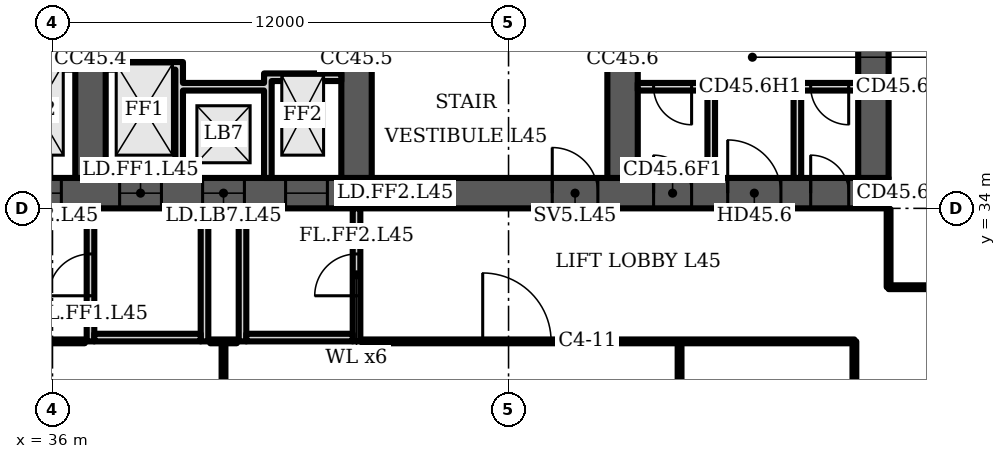
"""IFC4 building model, lengths in metres.
Left out: names, types, materials, properties, quantities, classifications, styles, units other than length and angle.
Written with IfcOpenShell. Run it as: python <this file> out.ifc"""

import sys

from ifc_helpers import new_model, si_unit, direction, frame, frame_2d, origin, place, context, subcontext, project, spatial, polyline, rectangle, outline, extrude, element, fill, save


model = new_model("IFC4")
c1 = context("Model", 3, precision=1e-05, world=origin(), true_north=direction((0.0, 1.0)))
c2 = subcontext(c1, "Body", "Model", "MODEL_VIEW")
j1 = project(units=[si_unit("LENGTHUNIT", "METRE"), si_unit("PLANEANGLEUNIT", "RADIAN")], contexts=[c1])
p1 = place(None, origin())
s1 = spatial("IfcSite", under=j1, at=p1, CompositionType="ELEMENT")
p2 = place(p1, origin())
s2 = spatial("IfcBuilding", under=s1, at=p2, CompositionType="ELEMENT")
p3 = place(p2, frame((0.0, 0.0, 184.3)))
s3 = spatial("IfcBuildingStorey", under=s2, at=p3, CompositionType="ELEMENT", Elevation=184.3)
p4 = place(p3, frame((16.0, 34.4, 0.0), z_axis=(0.0, 0.0, 1.0), x_axis=(1.0, 0.0, 0.0)))
e1 = element("IfcWall", 1, at=p4, inside=s3, PredefinedType="SHEAR", context=c2, shape_type="SweptSolid", body=[
    extrude(rectangle(XDim=42.0, YDim=0.8, at=frame_2d((21.0, 0.0))), origin(), (0.0, 0.0, 1.0), 3.6),
])
p5 = place(p4, frame((1.75, 0.0, 0.0)))
e2 = element("IfcOpeningElement", 2, at=p5, cuts=e1, PredefinedType="OPENING", context=c2, shape_type="SweptSolid", body=[
    extrude(rectangle(XDim=1.0, YDim=2.1, at=frame_2d((0.5, 1.05))), frame((0.0, 0.41, 0.0), z_axis=(0.0, -1.0, 0.0), x_axis=(1.0, 0.0, 0.0)), (0.0, 0.0, 1.0), 0.82),
])
p6 = place(p4, frame((4.65, 0.0, 0.0)))
e3 = element("IfcOpeningElement", 3, at=p6, cuts=e1, PredefinedType="OPENING", context=c2, shape_type="SweptSolid", body=[
    extrude(rectangle(XDim=1.0, YDim=2.1, at=frame_2d((0.5, 1.05))), frame((0.0, 0.41, 0.0), z_axis=(0.0, -1.0, 0.0), x_axis=(1.0, 0.0, 0.0)), (0.0, 0.0, 1.0), 0.82),
])
p7 = place(p4, frame((7.65, 0.0, 0.0)))
e4 = element("IfcOpeningElement", 4, at=p7, cuts=e1, PredefinedType="OPENING", context=c2, shape_type="SweptSolid", body=[
    extrude(rectangle(XDim=1.2, YDim=2.1, at=frame_2d((0.6, 1.05))), frame((0.0, 0.41, 0.0), z_axis=(0.0, -1.0, 0.0), x_axis=(1.0, 0.0, 0.0)), (0.0, 0.0, 1.0), 0.82),
])
p8 = place(p4, frame((14.767, 0.0, 0.0)))
e5 = element("IfcOpeningElement", 5, at=p8, cuts=e1, PredefinedType="OPENING", context=c2, shape_type="SweptSolid", body=[
    extrude(rectangle(XDim=1.1, YDim=2.1, at=frame_2d((0.55, 1.05))), frame((0.0, 0.41, 0.0), z_axis=(0.0, -1.0, 0.0), x_axis=(1.0, 0.0, 0.0)), (0.0, 0.0, 1.0), 0.82),
])
p9 = place(p4, frame((19.133, 0.0, 0.0)))
e6 = element("IfcOpeningElement", 6, at=p9, cuts=e1, PredefinedType="OPENING", context=c2, shape_type="SweptSolid", body=[
    extrude(rectangle(XDim=1.1, YDim=2.1, at=frame_2d((0.55, 1.05))), frame((0.0, 0.41, 0.0), z_axis=(0.0, -1.0, 0.0), x_axis=(1.0, 0.0, 0.0)), (0.0, 0.0, 1.0), 0.82),
])
p10 = place(p4, frame((16.8, 0.0, 0.0)))
e7 = element("IfcOpeningElement", 7, at=p10, cuts=e1, PredefinedType="OPENING", context=c2, shape_type="SweptSolid", body=[
    extrude(rectangle(XDim=1.4, YDim=2.1, at=frame_2d((0.7, 1.05))), frame((0.0, 0.41, 0.0), z_axis=(0.0, -1.0, 0.0), x_axis=(1.0, 0.0, 0.0)), (0.0, 0.0, 1.0), 0.82),
])
p11 = place(p4, frame((21.767, 0.0, 0.0)))
e8 = element("IfcOpeningElement", 8, at=p11, cuts=e1, PredefinedType="OPENING", context=c2, shape_type="SweptSolid", body=[
    extrude(rectangle(XDim=1.1, YDim=2.1, at=frame_2d((0.55, 1.05))), frame((0.0, 0.41, 0.0), z_axis=(0.0, -1.0, 0.0), x_axis=(1.0, 0.0, 0.0)), (0.0, 0.0, 1.0), 0.82),
])
p12 = place(p4, frame((23.95, 0.0, 0.0)))
e9 = element("IfcOpeningElement", 9, at=p12, cuts=e1, PredefinedType="OPENING", context=c2, shape_type="SweptSolid", body=[
    extrude(rectangle(XDim=1.1, YDim=2.1, at=frame_2d((0.55, 1.05))), frame((0.0, 0.41, 0.0), z_axis=(0.0, -1.0, 0.0), x_axis=(1.0, 0.0, 0.0)), (0.0, 0.0, 1.0), 0.82),
])
p13 = place(p4, frame((26.133, 0.0, 0.0)))
e10 = element("IfcOpeningElement", 10, at=p13, cuts=e1, PredefinedType="OPENING", context=c2, shape_type="SweptSolid", body=[
    extrude(rectangle(XDim=1.1, YDim=2.1, at=frame_2d((0.55, 1.05))), frame((0.0, 0.41, 0.0), z_axis=(0.0, -1.0, 0.0), x_axis=(1.0, 0.0, 0.0)), (0.0, 0.0, 1.0), 0.82),
])
p14 = place(p4, frame((33.15, 0.0, 0.0)))
e11 = element("IfcOpeningElement", 11, at=p14, cuts=e1, PredefinedType="OPENING", context=c2, shape_type="SweptSolid", body=[
    extrude(rectangle(XDim=1.2, YDim=2.1, at=frame_2d((0.6, 1.05))), frame((0.0, 0.41, 0.0), z_axis=(0.0, -1.0, 0.0), x_axis=(1.0, 0.0, 0.0)), (0.0, 0.0, 1.0), 0.82),
])
p15 = place(p4, frame((35.817, 0.0, 0.0)))
e12 = element("IfcOpeningElement", 12, at=p15, cuts=e1, PredefinedType="OPENING", context=c2, shape_type="SweptSolid", body=[
    extrude(rectangle(XDim=1.0, YDim=2.1, at=frame_2d((0.5, 1.05))), frame((0.0, 0.41, 0.0), z_axis=(0.0, -1.0, 0.0), x_axis=(1.0, 0.0, 0.0)), (0.0, 0.0, 1.0), 0.82),
])
p16 = place(p4, frame((39.95, 0.0, 0.0)))
e13 = element("IfcOpeningElement", 13, at=p16, cuts=e1, PredefinedType="OPENING", context=c2, shape_type="SweptSolid", body=[
    extrude(rectangle(XDim=1.0, YDim=2.1, at=frame_2d((0.5, 1.05))), frame((0.0, 0.41, 0.0), z_axis=(0.0, -1.0, 0.0), x_axis=(1.0, 0.0, 0.0)), (0.0, 0.0, 1.0), 0.82),
])
p17 = place(p4, frame((37.767, 0.0, 0.0)))
e14 = element("IfcOpeningElement", 14, at=p17, cuts=e1, PredefinedType="OPENING", context=c2, shape_type="SweptSolid", body=[
    extrude(rectangle(XDim=1.4, YDim=2.1, at=frame_2d((0.7, 1.05))), frame((0.0, 0.41, 0.0), z_axis=(0.0, -1.0, 0.0), x_axis=(1.0, 0.0, 0.0)), (0.0, 0.0, 1.0), 0.82),
])
p18 = place(p3, frame((37.0, 34.8, 0.0), z_axis=(0.0, 0.0, 1.0), x_axis=(0.0, 1.0, 0.0)))
e15 = element("IfcWall", 15, at=p18, inside=s3, PredefinedType="SHEAR", context=c2, shape_type="SweptSolid", body=[
    extrude(rectangle(XDim=14.987, YDim=0.8, at=frame_2d((7.493, 0.0))), origin(), (0.0, 0.0, 1.0), 3.6),
])
p19 = place(p18, frame((11.312, 0.0, 0.0)))
e16 = element("IfcOpeningElement", 16, at=p19, cuts=e15, PredefinedType="OPENING", context=c2, shape_type="SweptSolid", body=[
    extrude(rectangle(XDim=1.0, YDim=2.1, at=frame_2d((0.5, 1.05))), frame((0.0, 0.41, 0.0), z_axis=(0.0, -1.0, 0.0), x_axis=(1.0, 0.0, 0.0)), (0.0, 0.0, 1.0), 0.82),
])
p20 = place(p18, frame((3.6, 0.0, 0.0)))
e17 = element("IfcOpeningElement", 17, at=p20, cuts=e15, PredefinedType="OPENING", context=c2, shape_type="SweptSolid", body=[
    extrude(rectangle(XDim=1.1, YDim=2.1, at=frame_2d((0.55, 1.05))), frame((0.0, 0.41, 0.0), z_axis=(0.0, -1.0, 0.0), x_axis=(1.0, 0.0, 0.0)), (0.0, 0.0, 1.0), 0.82),
])
p21 = place(p3, frame((44.0, 34.8, 0.0), z_axis=(0.0, 0.0, 1.0), x_axis=(0.0, 1.0, 0.0)))
e18 = element("IfcWall", 18, at=p21, inside=s3, PredefinedType="SHEAR", context=c2, shape_type="SweptSolid", body=[
    extrude(rectangle(XDim=14.374, YDim=0.8, at=frame_2d((7.187, 0.0))), origin(), (0.0, 0.0, 1.0), 3.6),
])
p22 = place(p21, frame((11.312, 0.0, 0.0)))
e19 = element("IfcOpeningElement", 19, at=p22, cuts=e18, PredefinedType="OPENING", context=c2, shape_type="SweptSolid", body=[
    extrude(rectangle(XDim=1.0, YDim=2.1, at=frame_2d((0.5, 1.05))), frame((0.0, 0.41, 0.0), z_axis=(0.0, -1.0, 0.0), x_axis=(1.0, 0.0, 0.0)), (0.0, 0.0, 1.0), 0.82),
])
p23 = place(p21, frame((3.6, 0.0, 0.0)))
e20 = element("IfcOpeningElement", 20, at=p23, cuts=e18, PredefinedType="OPENING", context=c2, shape_type="SweptSolid", body=[
    extrude(rectangle(XDim=1.1, YDim=2.1, at=frame_2d((0.55, 1.05))), frame((0.0, 0.41, 0.0), z_axis=(0.0, -1.0, 0.0), x_axis=(1.0, 0.0, 0.0)), (0.0, 0.0, 1.0), 0.82),
])
p24 = place(p3, frame((51.0, 34.8, 0.0), z_axis=(0.0, 0.0, 1.0), x_axis=(0.0, 1.0, 0.0)))
e21 = element("IfcWall", 21, at=p24, inside=s3, PredefinedType="SHEAR", context=c2, shape_type="SweptSolid", body=[
    extrude(rectangle(XDim=13.762, YDim=0.8, at=frame_2d((6.881, 0.0))), origin(), (0.0, 0.0, 1.0), 3.6),
])
p25 = place(p24, frame((3.6, 0.0, 0.0)))
e22 = element("IfcOpeningElement", 22, at=p25, cuts=e21, PredefinedType="OPENING", context=c2, shape_type="SweptSolid", body=[
    extrude(rectangle(XDim=1.1, YDim=2.1, at=frame_2d((0.55, 1.05))), frame((0.0, 0.41, 0.0), z_axis=(0.0, -1.0, 0.0), x_axis=(1.0, 0.0, 0.0)), (0.0, 0.0, 1.0), 0.82),
])
p26 = place(p3, frame((57.6, 34.8, 0.0), z_axis=(0.0, 0.0, 1.0), x_axis=(0.0, 1.0, 0.0)))
e23 = element("IfcWall", 23, at=p26, inside=s3, PredefinedType="SHEAR", context=c2, shape_type="SweptSolid", body=[
    extrude(rectangle(XDim=13.184, YDim=0.8, at=frame_2d((6.592, 0.0))), origin(), (0.0, 0.0, 1.0), 3.6),
])
p27 = place(p3, frame((0.0, 0.0, -0.0)))
e24 = element("IfcWall", 24, at=p27, inside=s3, PredefinedType="PARTITIONING", context=c2, shape_type="SweptSolid", body=[
    extrude(outline(polyline([(34.567, 37.85), (34.767, 37.85), (36.6, 37.85), (36.6, 37.65), (34.767, 37.65), (34.767, 34.8), (34.567, 34.8), (34.567, 37.85)])), origin(), (0.0, 0.0, 1.0), 3.2),
])
p28 = place(p3, frame((0.0, 0.0, -0.0)))
e25 = element("IfcWall", 25, at=p28, inside=s3, PredefinedType="PARTITIONING", context=c2, shape_type="SweptSolid", body=[
    extrude(outline(polyline([(41.567, 37.1), (39.433, 37.1), (39.433, 34.8), (39.233, 34.8), (39.233, 37.65), (37.4, 37.65), (37.4, 37.85), (39.233, 37.85), (39.433, 37.85), (39.433, 37.3), (41.567, 37.3), (41.567, 37.55), (41.767, 37.55), (43.6, 37.55), (43.6, 37.35), (41.767, 37.35), (41.767, 34.8), (41.567, 34.8), (41.567, 37.1)])), origin(), (0.0, 0.0, 1.0), 3.2),
])
p29 = place(p3, frame((51.4, 37.2, 0.0), z_axis=(0.0, 0.0, 1.0), x_axis=(1.0, 0.0, 0.0)))
e26 = element("IfcWall", 26, at=p29, inside=s3, PredefinedType="PARTITIONING", context=c2, shape_type="SweptSolid", body=[
    extrude(rectangle(XDim=1.833, YDim=0.2, at=frame_2d((0.917, 0.0))), origin(), (0.0, 0.0, 1.0), 3.2),
])
p30 = place(p29, frame((0.417, 0.0, 0.0)))
e27 = element("IfcOpeningElement", 27, at=p30, cuts=e26, PredefinedType="OPENING", context=c2, shape_type="SweptSolid", body=[
    extrude(rectangle(XDim=1.0, YDim=2.1, at=frame_2d((0.5, 1.05))), frame((0.0, 0.11, 0.0), z_axis=(0.0, -1.0, 0.0), x_axis=(1.0, 0.0, 0.0)), (0.0, 0.0, 1.0), 0.22),
])
p31 = place(p3, frame((55.7, 37.2, 0.0), z_axis=(0.0, 0.0, 1.0), x_axis=(1.0, 0.0, 0.0)))
e28 = element("IfcWall", 28, at=p31, inside=s3, PredefinedType="PARTITIONING", context=c2, shape_type="SweptSolid", body=[
    extrude(rectangle(XDim=1.5, YDim=0.2, at=frame_2d((0.75, 0.0))), origin(), (0.0, 0.0, 1.0), 3.2),
])
p32 = place(p31, frame((0.25, 0.0, 0.0)))
e29 = element("IfcOpeningElement", 29, at=p32, cuts=e28, PredefinedType="OPENING", context=c2, shape_type="SweptSolid", body=[
    extrude(rectangle(XDim=1.0, YDim=2.1, at=frame_2d((0.5, 1.05))), frame((0.0, 0.11, 0.0), z_axis=(0.0, -1.0, 0.0), x_axis=(1.0, 0.0, 0.0)), (0.0, 0.0, 1.0), 0.22),
])
p33 = place(p3, frame((0.0, 0.0, -0.0)))
e30 = element("IfcWall", 30, at=p33, inside=s3, PredefinedType="PARTITIONING", context=c2, shape_type="SweptSolid", body=[
    extrude(outline(polyline([(53.233, 34.8), (53.233, 37.3), (53.433, 37.3), (53.433, 34.8), (53.233, 34.8)])), origin(), (0.0, 0.0, 1.0), 3.2),
])
p34 = place(p3, frame((0.0, 0.0, -0.0)))
e31 = element("IfcWall", 31, at=p34, inside=s3, PredefinedType="PARTITIONING", context=c2, shape_type="SweptSolid", body=[
    extrude(outline(polyline([(55.5, 34.8), (55.5, 37.3), (55.7, 37.3), (55.7, 34.8), (55.5, 34.8)])), origin(), (0.0, 0.0, 1.0), 3.2),
])
p35 = place(p3, frame((37.0, 30.5, 0.0), z_axis=(0.0, 0.0, 1.0), x_axis=(0.0, 1.0, 0.0)))
e32 = element("IfcWall", 32, at=p35, inside=s3, PredefinedType="PARTITIONING", context=c2, shape_type="SweptSolid", body=[
    extrude(rectangle(XDim=3.5, YDim=0.2, at=frame_2d((1.75, 0.0))), origin(), (0.0, 0.0, 1.0), 3.2),
])
p36 = place(p35, frame((1.2, 0.0, 0.0)))
e33 = element("IfcOpeningElement", 33, at=p36, cuts=e32, PredefinedType="OPENING", context=c2, shape_type="SweptSolid", body=[
    extrude(rectangle(XDim=1.1, YDim=2.1, at=frame_2d((0.55, 1.05))), frame((0.0, 0.11, 0.0), z_axis=(0.0, -1.0, 0.0), x_axis=(1.0, 0.0, 0.0)), (0.0, 0.0, 1.0), 0.22),
])
p37 = place(p3, frame((40.0, 30.5, 0.0), z_axis=(0.0, 0.0, 1.0), x_axis=(0.0, 1.0, 0.0)))
e34 = element("IfcWall", 34, at=p37, inside=s3, PredefinedType="PARTITIONING", context=c2, shape_type="SweptSolid", body=[
    extrude(rectangle(XDim=3.5, YDim=0.2, at=frame_2d((1.75, 0.0))), origin(), (0.0, 0.0, 1.0), 3.2),
])
p38 = place(p3, frame((37.1, 30.6, 0.0), z_axis=(0.0, 0.0, 1.0), x_axis=(1.0, 0.0, 0.0)))
e35 = element("IfcWall", 35, at=p38, inside=s3, PredefinedType="PARTITIONING", context=c2, shape_type="SweptSolid", body=[
    extrude(rectangle(XDim=2.8, YDim=0.2, at=frame_2d((1.4, 0.0))), origin(), (0.0, 0.0, 1.0), 3.2),
])
p39 = place(p3, frame((41.0, 30.5, 0.0), z_axis=(0.0, 0.0, 1.0), x_axis=(0.0, 1.0, 0.0)))
e36 = element("IfcWall", 36, at=p39, inside=s3, PredefinedType="PARTITIONING", context=c2, shape_type="SweptSolid", body=[
    extrude(rectangle(XDim=3.5, YDim=0.2, at=frame_2d((1.75, 0.0))), origin(), (0.0, 0.0, 1.0), 3.2),
])
p40 = place(p3, frame((44.0, 30.5, 0.0), z_axis=(0.0, 0.0, 1.0), x_axis=(0.0, 1.0, 0.0)))
e37 = element("IfcWall", 37, at=p40, inside=s3, PredefinedType="PARTITIONING", context=c2, shape_type="SweptSolid", body=[
    extrude(rectangle(XDim=3.5, YDim=0.2, at=frame_2d((1.75, 0.0))), origin(), (0.0, 0.0, 1.0), 3.2),
])
p41 = place(p40, frame((1.2, 0.0, 0.0)))
e38 = element("IfcOpeningElement", 38, at=p41, cuts=e37, PredefinedType="OPENING", context=c2, shape_type="SweptSolid", body=[
    extrude(rectangle(XDim=1.1, YDim=2.1, at=frame_2d((0.55, 1.05))), frame((0.0, 0.11, 0.0), z_axis=(0.0, -1.0, 0.0), x_axis=(1.0, 0.0, 0.0)), (0.0, 0.0, 1.0), 0.22),
])
p42 = place(p3, frame((41.1, 30.6, 0.0), z_axis=(0.0, 0.0, 1.0), x_axis=(1.0, 0.0, 0.0)))
e39 = element("IfcWall", 39, at=p42, inside=s3, PredefinedType="PARTITIONING", context=c2, shape_type="SweptSolid", body=[
    extrude(rectangle(XDim=2.8, YDim=0.2, at=frame_2d((1.4, 0.0))), origin(), (0.0, 0.0, 1.0), 3.2),
])
p43 = place(p3, frame((17.8, 30.5, 0.0), z_axis=(0.0, 0.0, 1.0), x_axis=(1.0, 0.0, 0.0)))
e40 = element("IfcWall", 40, at=p43, inside=s3, PredefinedType="PARTITIONING", context=c2, shape_type="SweptSolid", body=[
    extrude(rectangle(XDim=19.05, YDim=0.1, at=frame_2d((9.525, 0.0))), origin(), (0.0, 0.0, 1.0), 3.2),
])
p44 = place(p3, frame((40.5, 1.489, 0.0), z_axis=(0.0, 0.0, 1.0), x_axis=(0.0, 1.0, 0.0)))
e41 = element("IfcWall", 41, at=p44, inside=s3, PredefinedType="PARTITIONING", context=c2, shape_type="SweptSolid", body=[
    extrude(rectangle(XDim=29.011, YDim=0.1, at=frame_2d((14.505, 0.0))), origin(), (0.0, 0.0, 1.0), 3.2),
])
p45 = place(p3, frame((52.5, 1.98, 0.0), z_axis=(0.0, 0.0, 1.0), x_axis=(0.0, 1.0, 0.0)))
e42 = element("IfcWall", 42, at=p45, inside=s3, PredefinedType="PARTITIONING", context=c2, shape_type="SweptSolid", body=[
    extrude(rectangle(XDim=28.52, YDim=0.1, at=frame_2d((14.26, 0.0))), origin(), (0.0, 0.0, 1.0), 3.2),
])
p46 = place(p3, frame((57.1, 11.985, 0.0), z_axis=(0.0, 0.0, 1.0), x_axis=(0.0, 1.0, 0.0)))
e43 = element("IfcWall", 43, at=p46, inside=s3, PredefinedType="PARTITIONING", context=c2, shape_type="SweptSolid", body=[
    extrude(rectangle(XDim=18.515, YDim=0.1, at=frame_2d((9.257, 0.0))), origin(), (0.0, 0.0, 1.0), 3.2),
])
p47 = place(p46, frame((8.295, 0.0, 0.0)))
e44 = element("IfcOpeningElement", 44, at=p47, cuts=e43, PredefinedType="OPENING", context=c2, shape_type="SweptSolid", body=[
    extrude(rectangle(XDim=1.8, YDim=2.1, at=frame_2d((0.9, 1.05))), frame((0.0, 0.06, 0.0), z_axis=(0.0, -1.0, 0.0), x_axis=(1.0, 0.0, 0.0)), (0.0, 0.0, 1.0), 0.12),
])
p48 = place(p3, frame((58.0, 31.925, 0.0), z_axis=(0.0, 0.0, 1.0), x_axis=(0.0, 1.0, 0.0)))
e45 = element("IfcWall", 45, at=p48, inside=s3, PredefinedType="PARTITIONING", context=c2, shape_type="SweptSolid", body=[
    extrude(rectangle(XDim=2.055, YDim=0.1, at=frame_2d((1.027, 0.0))), origin(), (0.0, 0.0, 1.0), 3.2),
])
p49 = place(p3, frame((58.0, 31.925, 0.0), z_axis=(0.0, 0.0, 1.0), x_axis=(1.0, 0.0, 0.0)))
e46 = element("IfcWall", 46, at=p49, inside=s3, PredefinedType="PARTITIONING", context=c2, shape_type="SweptSolid", body=[
    extrude(rectangle(XDim=1.425, YDim=0.1, at=frame_2d((0.712, 0.0))), origin(), (0.0, 0.0, 1.0), 3.2),
])
p50 = place(p3, frame((58.9, 27.435, 0.0), z_axis=(0.0, 0.0, 1.0), x_axis=(0.178584, 0.983924, 0.0)))
e47 = element("IfcWall", 47, at=p50, inside=s3, PredefinedType="PARTITIONING", context=c2, shape_type="SweptSolid", body=[
    extrude(rectangle(XDim=2.353, YDim=0.1, at=frame_2d((1.176, 0.0))), origin(), (0.0, 0.0, 1.0), 3.2),
])
p51 = place(p3, frame((40.15, 30.5, 0.0), z_axis=(0.0, 0.0, 1.0), x_axis=(1.0, 0.0, 0.0)))
e48 = element("IfcWall", 48, at=p51, inside=s3, PredefinedType="PARTITIONING", context=c2, shape_type="SweptSolid", body=[
    extrude(rectangle(XDim=0.7, YDim=0.1, at=frame_2d((0.35, 0.0))), origin(), (0.0, 0.0, 1.0), 3.2),
])
p52 = place(p3, frame((44.15, 30.5, 0.0), z_axis=(0.0, 0.0, 1.0), x_axis=(1.0, 0.0, 0.0)))
e49 = element("IfcWall", 49, at=p52, inside=s3, PredefinedType="PARTITIONING", context=c2, shape_type="SweptSolid", body=[
    extrude(rectangle(XDim=12.95, YDim=0.1, at=frame_2d((6.475, 0.0))), origin(), (0.0, 0.0, 1.0), 3.2),
])
p53 = place(p52, frame((3.17, 0.0, 0.0)))
e50 = element("IfcOpeningElement", 50, at=p53, cuts=e49, PredefinedType="OPENING", context=c2, shape_type="SweptSolid", body=[
    extrude(rectangle(XDim=1.8, YDim=2.1, at=frame_2d((0.9, 1.05))), frame((0.0, 0.06, 0.0), z_axis=(0.0, -1.0, 0.0), x_axis=(1.0, 0.0, 0.0)), (0.0, 0.0, 1.0), 0.12),
])
p54 = place(p9, origin())
e51 = element("IfcDoor", 51, at=p54, inside=s3, OperationType="DOUBLE_DOOR_SLIDING", PredefinedType="DOOR", context=c2, shape_type="SweptSolid", body=[
    extrude(rectangle(XDim=1.1, YDim=2.1, at=frame_2d((0.55, 1.05))), frame((0.0, 0.025, 0.0), z_axis=(0.0, -1.0, 0.0), x_axis=(1.0, 0.0, 0.0)), (0.0, 0.0, 1.0), 0.05),
])
fill(e6, e51)
p55 = place(p11, origin())
e52 = element("IfcDoor", 52, at=p55, inside=s3, OperationType="DOUBLE_DOOR_SLIDING", PredefinedType="DOOR", context=c2, shape_type="SweptSolid", body=[
    extrude(rectangle(XDim=1.1, YDim=2.1, at=frame_2d((0.55, 1.05))), frame((0.0, 0.025, 0.0), z_axis=(0.0, -1.0, 0.0), x_axis=(1.0, 0.0, 0.0)), (0.0, 0.0, 1.0), 0.05),
])
fill(e8, e52)
p56 = place(p12, origin())
e53 = element("IfcDoor", 53, at=p56, inside=s3, OperationType="DOUBLE_DOOR_SLIDING", PredefinedType="DOOR", context=c2, shape_type="SweptSolid", body=[
    extrude(rectangle(XDim=1.1, YDim=2.1, at=frame_2d((0.55, 1.05))), frame((0.0, 0.025, 0.0), z_axis=(0.0, -1.0, 0.0), x_axis=(1.0, 0.0, 0.0)), (0.0, 0.0, 1.0), 0.05),
])
fill(e9, e53)
p57 = place(p13, origin())
e54 = element("IfcDoor", 54, at=p57, inside=s3, OperationType="DOUBLE_DOOR_SLIDING", PredefinedType="DOOR", context=c2, shape_type="SweptSolid", body=[
    extrude(rectangle(XDim=1.1, YDim=2.1, at=frame_2d((0.55, 1.05))), frame((0.0, 0.025, 0.0), z_axis=(0.0, -1.0, 0.0), x_axis=(1.0, 0.0, 0.0)), (0.0, 0.0, 1.0), 0.05),
])
fill(e10, e54)
p58 = place(p14, origin())
e55 = element("IfcDoor", 55, at=p58, inside=s3, OperationType="SINGLE_SWING_LEFT", PredefinedType="DOOR", context=c2, shape_type="SweptSolid", body=[
    extrude(rectangle(XDim=1.2, YDim=2.1, at=frame_2d((0.6, 1.05))), frame((0.0, 0.025, 0.0), z_axis=(0.0, -1.0, 0.0), x_axis=(1.0, 0.0, 0.0)), (0.0, 0.0, 1.0), 0.05),
])
fill(e11, e55)
p59 = place(p15, origin())
e56 = element("IfcDoor", 56, at=p59, inside=s3, OperationType="SINGLE_SWING_LEFT", PredefinedType="DOOR", context=c2, shape_type="SweptSolid", body=[
    extrude(rectangle(XDim=1.0, YDim=2.1, at=frame_2d((0.5, 1.05))), frame((0.0, 0.4, 0.0), z_axis=(0.0, -1.0, 0.0), x_axis=(1.0, 0.0, 0.0)), (0.0, 0.0, 1.0), 0.8),
])
fill(e12, e56)
p60 = place(p30, origin())
e57 = element("IfcDoor", 57, at=p60, inside=s3, OperationType="SINGLE_SWING_RIGHT", PredefinedType="DOOR", context=c2, shape_type="SweptSolid", body=[
    extrude(rectangle(XDim=1.0, YDim=2.1, at=frame_2d((0.5, 1.05))), frame((0.0, 0.025, 0.0), z_axis=(0.0, -1.0, 0.0), x_axis=(1.0, 0.0, 0.0)), (0.0, 0.0, 1.0), 0.05),
])
fill(e27, e57)
p61 = place(p16, origin())
e58 = element("IfcDoor", 58, at=p61, inside=s3, OperationType="SINGLE_SWING_LEFT", PredefinedType="DOOR", context=c2, shape_type="SweptSolid", body=[
    extrude(rectangle(XDim=1.0, YDim=2.1, at=frame_2d((0.5, 1.05))), frame((0.0, 0.4, 0.0), z_axis=(0.0, -1.0, 0.0), x_axis=(1.0, 0.0, 0.0)), (0.0, 0.0, 1.0), 0.8),
])
fill(e13, e58)
p62 = place(p32, origin())
e59 = element("IfcDoor", 59, at=p62, inside=s3, OperationType="SINGLE_SWING_RIGHT", PredefinedType="DOOR", context=c2, shape_type="SweptSolid", body=[
    extrude(rectangle(XDim=1.0, YDim=2.1, at=frame_2d((0.5, 1.05))), frame((0.0, 0.025, 0.0), z_axis=(0.0, -1.0, 0.0), x_axis=(1.0, 0.0, 0.0)), (0.0, 0.0, 1.0), 0.05),
])
fill(e29, e59)
p63 = place(p17, origin())
e60 = element("IfcDoor", 60, at=p63, inside=s3, OperationType="DOUBLE_DOOR_SINGLE_SWING", PredefinedType="DOOR", context=c2, shape_type="SweptSolid", body=[
    extrude(rectangle(XDim=1.4, YDim=2.1, at=frame_2d((0.7, 1.05))), frame((0.0, 0.025, 0.0), z_axis=(0.0, -1.0, 0.0), x_axis=(1.0, 0.0, 0.0)), (0.0, 0.0, 1.0), 0.05),
])
fill(e14, e60)
p64 = place(p36, origin())
e61 = element("IfcDoor", 61, at=p64, inside=s3, OperationType="SINGLE_SWING_LEFT", PredefinedType="DOOR", context=c2, shape_type="SweptSolid", body=[
    extrude(rectangle(XDim=1.1, YDim=2.1, at=frame_2d((0.55, 1.05))), frame((0.0, 0.025, 0.0), z_axis=(0.0, -1.0, 0.0), x_axis=(1.0, 0.0, 0.0)), (0.0, 0.0, 1.0), 0.05),
])
fill(e33, e61)
p65 = place(p41, origin())
e62 = element("IfcDoor", 62, at=p65, inside=s3, OperationType="SINGLE_SWING_LEFT", PredefinedType="DOOR", context=c2, shape_type="SweptSolid", body=[
    extrude(rectangle(XDim=1.1, YDim=2.1, at=frame_2d((0.55, 1.05))), frame((0.0, 0.025, 0.0), z_axis=(0.0, -1.0, 0.0), x_axis=(1.0, 0.0, 0.0)), (0.0, 0.0, 1.0), 0.05),
])
fill(e38, e62)
p66 = place(p53, origin())
e63 = element("IfcDoor", 63, at=p66, inside=s3, OperationType="DOUBLE_DOOR_SINGLE_SWING", PredefinedType="DOOR", context=c2, shape_type="SweptSolid", body=[
    extrude(rectangle(XDim=1.8, YDim=2.1, at=frame_2d((0.9, 1.05))), frame((0.0, 0.025, 0.0), z_axis=(0.0, -1.0, 0.0), x_axis=(1.0, 0.0, 0.0)), (0.0, 0.0, 1.0), 0.05),
])
fill(e50, e63)
save(model, sys.argv[1])
